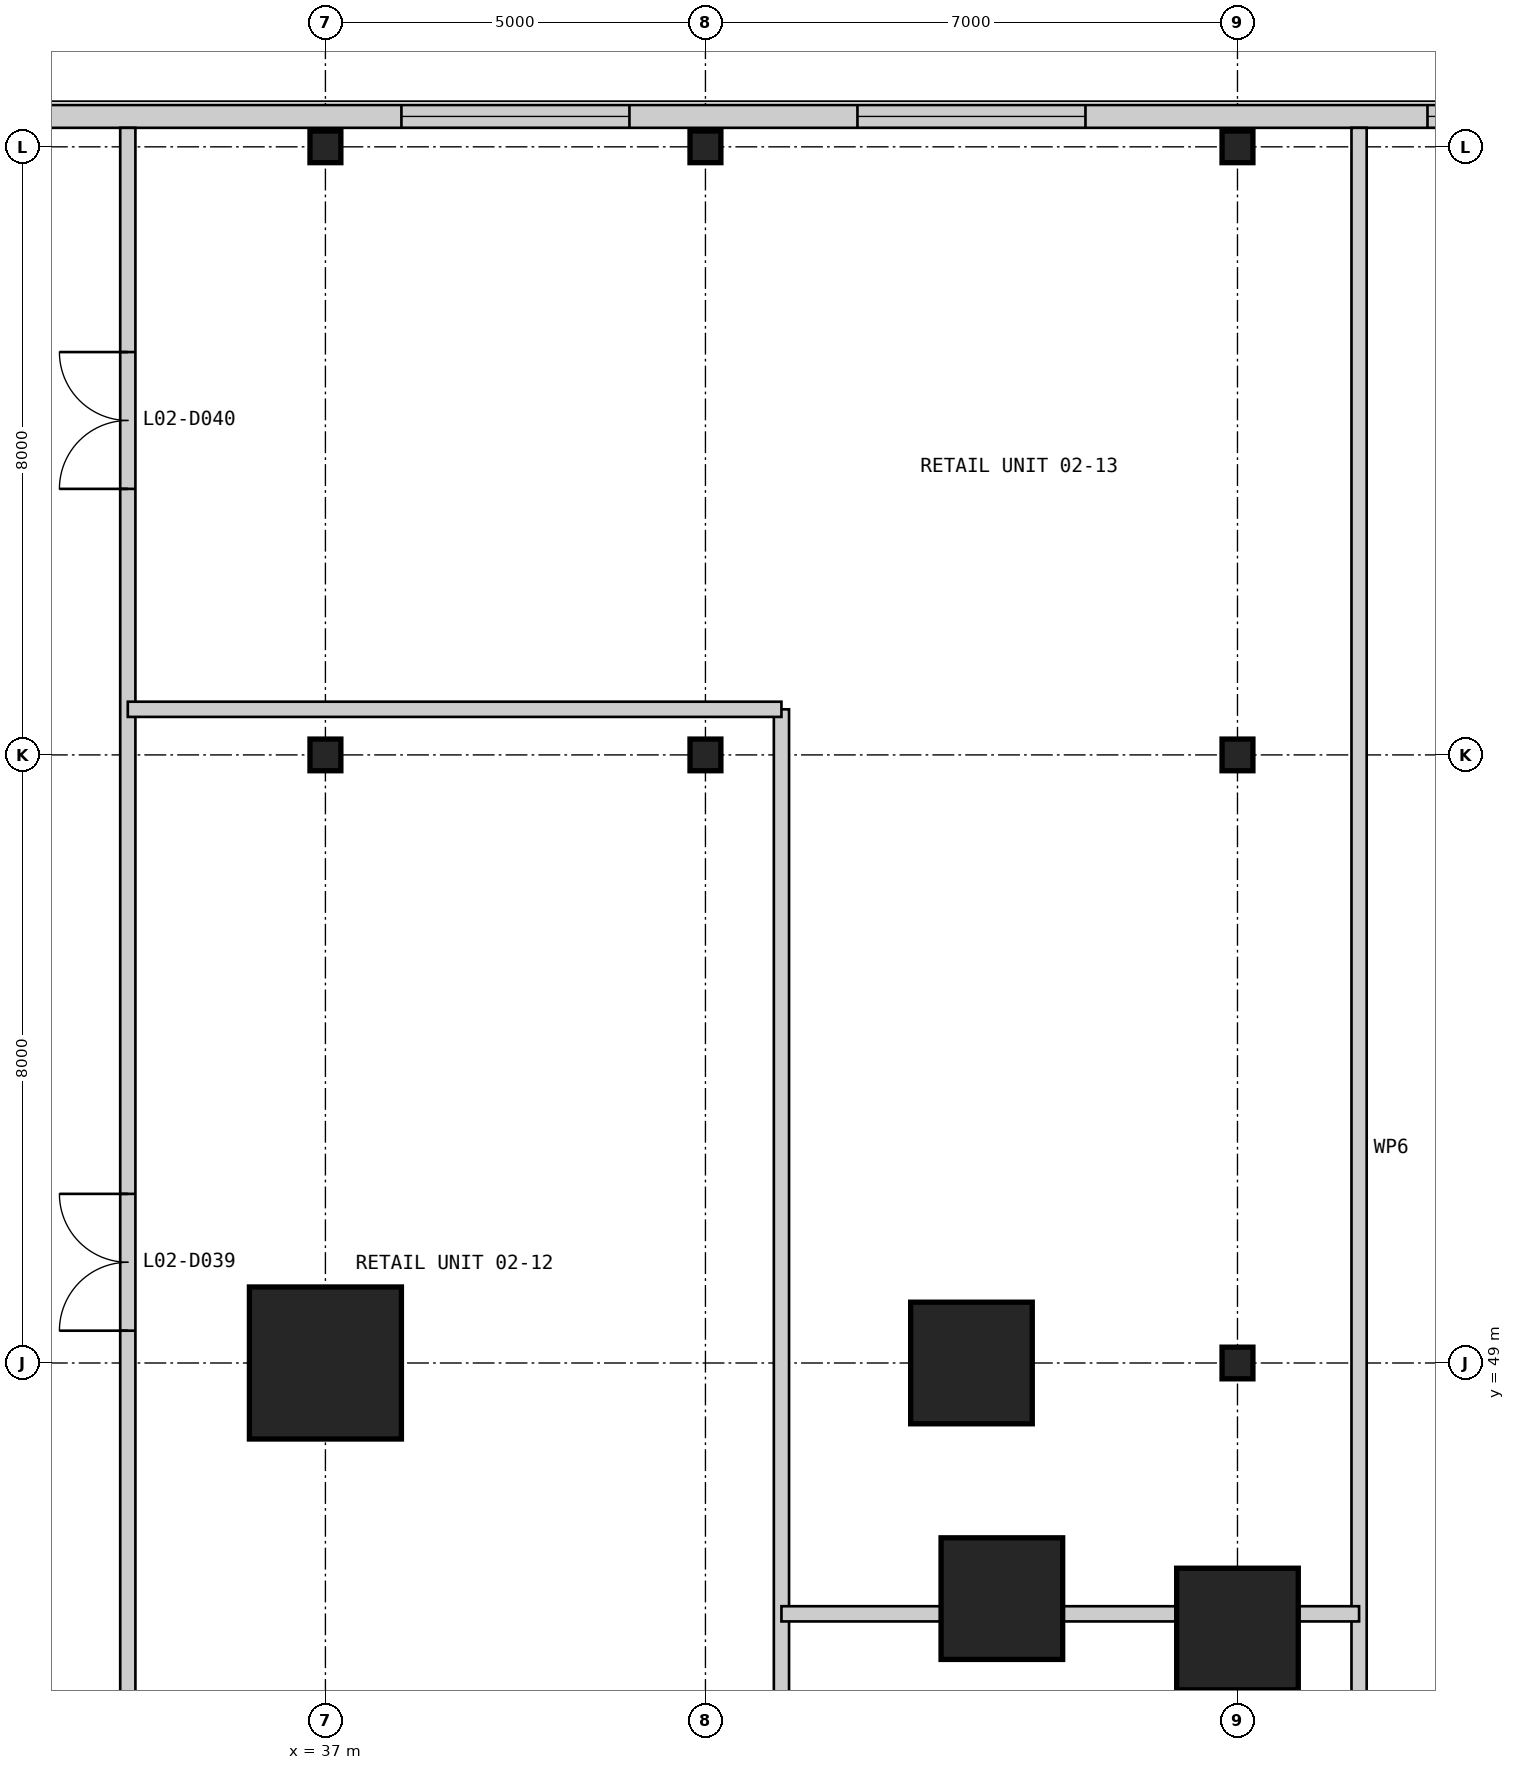
"""IFC4 building model, lengths in metres.
Left out: names, types, materials, properties, quantities, classifications, styles, units other than length and angle.
Written with IfcOpenShell. Run it as: python <this file> out.ifc"""

import sys

from ifc_helpers import new_model, si_unit, direction, frame, frame_2d, origin, origin_2d, place, context, subcontext, project, spatial, rectangle, i_section, extrude, element, fill, save


model = new_model("IFC4")
c1 = context("Model", 3, precision=1e-05, world=origin(), true_north=direction((0.0, 1.0)))
c2 = subcontext(c1, "Body", "Model", "MODEL_VIEW")
j1 = project(units=[si_unit("LENGTHUNIT", "METRE"), si_unit("PLANEANGLEUNIT", "RADIAN")], contexts=[c1])
p1 = place(None, origin())
s1 = spatial("IfcSite", under=j1, at=p1, CompositionType="ELEMENT")
p2 = place(p1, origin())
s2 = spatial("IfcBuilding", under=s1, at=p2, CompositionType="ELEMENT")
p3 = place(p2, frame((0.0, 0.0, 11.8)))
s3 = spatial("IfcBuildingStorey", under=s2, at=p3, CompositionType="ELEMENT", Elevation=11.8)
for number, where, z_axis, x_axis in (
    (1, (49.0, 45.5, 0.0), (0.0, 0.0, 1.0), (1.0, 0.0, 0.0)),
    (2, (45.9, 45.9, 0.0), (0.0, 0.0, 1.0), (1.0, 0.0, 0.0)),
    (3, (45.5, 49.0, 0.0), (0.0, 0.0, 1.0), (1.0, 0.0, 0.0)),
):
    element("IfcColumn", number, at=place(p3, frame(where, z_axis=z_axis, x_axis=x_axis)), inside=s3, PredefinedType="COLUMN", context=c2, shape_type="SweptSolid", body=[
        extrude(rectangle(XDim=1.6, YDim=1.6, at=origin_2d()), origin(), (0.0, 0.0, 1.0), 4.8),
    ])
p4 = place(p3, frame((37.0, 49.0, 0.0), z_axis=(0.0, 0.0, 1.0), x_axis=(1.0, 0.0, 0.0)))
e4 = element("IfcColumn", 4, at=p4, inside=s3, PredefinedType="COLUMN", context=c2, shape_type="SweptSolid", body=[
    extrude(rectangle(XDim=2.0, YDim=2.0, at=origin_2d()), origin(), (0.0, 0.0, 1.0), 4.8),
])
for number, where, z_axis, x_axis in (
    (5, (37.0, 57.0, 0.0), (0.0, 0.0, 1.0), (1.0, 0.0, 0.0)),
    (6, (37.0, 65.0, 0.0), (0.0, 0.0, 1.0), (1.0, 0.0, 0.0)),
    (7, (42.0, 57.0, 0.0), (0.0, 0.0, 1.0), (1.0, 0.0, 0.0)),
    (8, (42.0, 65.0, 0.0), (0.0, 0.0, 1.0), (1.0, 0.0, 0.0)),
    (9, (49.0, 49.0, 0.0), (0.0, 0.0, 1.0), (1.0, 0.0, 0.0)),
    (10, (49.0, 57.0, 0.0), (0.0, 0.0, 1.0), (1.0, 0.0, 0.0)),
    (11, (49.0, 65.0, 0.0), (0.0, 0.0, 1.0), (1.0, 0.0, 0.0)),
):
    element("IfcColumn", number, at=place(p3, frame(where, z_axis=z_axis, x_axis=x_axis)), inside=s3, PredefinedType="COLUMN", context=c2, shape_type="SweptSolid", body=[
        extrude(i_section(OverallWidth=0.406, OverallDepth=0.417, WebThickness=0.03, FlangeThickness=0.048, at=origin_2d()), origin(), (0.0, 0.0, 1.0), 4.8),
    ])
p5 = place(p3, frame((57.55, 65.4, 0.0), z_axis=(0.0, 0.0, 1.0), x_axis=(-1.0, 0.0, 0.0)))
e12 = element("IfcWall", 12, at=p5, inside=s3, PredefinedType="SOLIDWALL", context=c2, shape_type="SweptSolid", body=[
    extrude(rectangle(XDim=73.1, YDim=0.3, at=frame_2d((36.55, 0.0))), origin(), (0.0, 0.0, 1.0), 4.5),
])
p6 = place(p5, frame((67.05, 0.0, 0.9)))
e13 = element("IfcOpeningElement", 13, at=p6, cuts=e12, PredefinedType="OPENING", context=c2, shape_type="SweptSolid", body=[
    extrude(rectangle(XDim=3.0, YDim=2.4, at=frame_2d((1.5, 1.2))), frame((0.0, 0.16, 0.0), z_axis=(0.0, -1.0, 0.0), x_axis=(1.0, 0.0, 0.0)), (0.0, 0.0, 1.0), 0.32),
])
p7 = place(p5, frame((59.05, 0.0, 0.9)))
e14 = element("IfcOpeningElement", 14, at=p7, cuts=e12, PredefinedType="OPENING", context=c2, shape_type="SweptSolid", body=[
    extrude(rectangle(XDim=3.0, YDim=2.4, at=frame_2d((1.5, 1.2))), frame((0.0, 0.16, 0.0), z_axis=(0.0, -1.0, 0.0), x_axis=(1.0, 0.0, 0.0)), (0.0, 0.0, 1.0), 0.32),
])
p8 = place(p5, frame((51.05, 0.0, 0.9)))
e15 = element("IfcOpeningElement", 15, at=p8, cuts=e12, PredefinedType="OPENING", context=c2, shape_type="SweptSolid", body=[
    extrude(rectangle(XDim=3.0, YDim=2.4, at=frame_2d((1.5, 1.2))), frame((0.0, 0.16, 0.0), z_axis=(0.0, -1.0, 0.0), x_axis=(1.0, 0.0, 0.0)), (0.0, 0.0, 1.0), 0.32),
])
p9 = place(p5, frame((37.05, 0.0, 0.9)))
e16 = element("IfcOpeningElement", 16, at=p9, cuts=e12, PredefinedType="OPENING", context=c2, shape_type="SweptSolid", body=[
    extrude(rectangle(XDim=3.0, YDim=2.4, at=frame_2d((1.5, 1.2))), frame((0.0, 0.16, 0.0), z_axis=(0.0, -1.0, 0.0), x_axis=(1.0, 0.0, 0.0)), (0.0, 0.0, 1.0), 0.32),
])
p10 = place(p5, frame((25.05, 0.0, 0.9)))
e17 = element("IfcOpeningElement", 17, at=p10, cuts=e12, PredefinedType="OPENING", context=c2, shape_type="SweptSolid", body=[
    extrude(rectangle(XDim=3.0, YDim=2.4, at=frame_2d((1.5, 1.2))), frame((0.0, 0.16, 0.0), z_axis=(0.0, -1.0, 0.0), x_axis=(1.0, 0.0, 0.0)), (0.0, 0.0, 1.0), 0.32),
])
p11 = place(p5, frame((16.55, 0.0, 0.9)))
e18 = element("IfcOpeningElement", 18, at=p11, cuts=e12, PredefinedType="OPENING", context=c2, shape_type="SweptSolid", body=[
    extrude(rectangle(XDim=3.0, YDim=2.4, at=frame_2d((1.5, 1.2))), frame((0.0, 0.16, 0.0), z_axis=(0.0, -1.0, 0.0), x_axis=(1.0, 0.0, 0.0)), (0.0, 0.0, 1.0), 0.32),
])
p12 = place(p5, frame((10.55, 0.0, 0.9)))
e19 = element("IfcOpeningElement", 19, at=p12, cuts=e12, PredefinedType="OPENING", context=c2, shape_type="SweptSolid", body=[
    extrude(rectangle(XDim=3.0, YDim=2.4, at=frame_2d((1.5, 1.2))), frame((0.0, 0.16, 0.0), z_axis=(0.0, -1.0, 0.0), x_axis=(1.0, 0.0, 0.0)), (0.0, 0.0, 1.0), 0.32),
])
p13 = place(p5, frame((3.05, 0.0, 0.9)))
e20 = element("IfcOpeningElement", 20, at=p13, cuts=e12, PredefinedType="OPENING", context=c2, shape_type="SweptSolid", body=[
    extrude(rectangle(XDim=3.0, YDim=2.4, at=frame_2d((1.5, 1.2))), frame((0.0, 0.16, 0.0), z_axis=(0.0, -1.0, 0.0), x_axis=(1.0, 0.0, 0.0)), (0.0, 0.0, 1.0), 0.32),
])
p14 = place(p3, frame((34.4, 43.0, 0.0), z_axis=(0.0, 0.0, 1.0), x_axis=(0.0, 1.0, 0.0)))
e21 = element("IfcWall", 21, at=p14, inside=s3, PredefinedType="PARTITIONING", context=c2, shape_type="SweptSolid", body=[
    extrude(rectangle(XDim=22.25, YDim=0.2, at=frame_2d((11.125, 0.0))), origin(), (0.0, 0.0, 1.0), 4.5),
])
p15 = place(p14, frame((6.425, 0.0, 0.0)))
e22 = element("IfcOpeningElement", 22, at=p15, cuts=e21, PredefinedType="OPENING", context=c2, shape_type="SweptSolid", body=[
    extrude(rectangle(XDim=1.8, YDim=2.4, at=frame_2d((0.9, 1.2))), frame((0.0, 0.11, 0.0), z_axis=(0.0, -1.0, 0.0), x_axis=(1.0, 0.0, 0.0)), (0.0, 0.0, 1.0), 0.22),
])
p16 = place(p14, frame((17.5, 0.0, 0.0)))
e23 = element("IfcOpeningElement", 23, at=p16, cuts=e21, PredefinedType="OPENING", context=c2, shape_type="SweptSolid", body=[
    extrude(rectangle(XDim=1.8, YDim=2.4, at=frame_2d((0.9, 1.2))), frame((0.0, 0.11, 0.0), z_axis=(0.0, -1.0, 0.0), x_axis=(1.0, 0.0, 0.0)), (0.0, 0.0, 1.0), 0.22),
])
p17 = place(p3, frame((43.0, 37.0, 0.0), z_axis=(0.0, 0.0, 1.0), x_axis=(0.0, 1.0, 0.0)))
e24 = element("IfcWall", 24, at=p17, inside=s3, PredefinedType="PARTITIONING", context=c2, shape_type="SweptSolid", body=[
    extrude(rectangle(XDim=20.6, YDim=0.2, at=frame_2d((10.3, 0.0))), origin(), (0.0, 0.0, 1.0), 4.5),
])
p18 = place(p3, frame((50.6, 38.4, 0.0), z_axis=(0.0, 0.0, 1.0), x_axis=(0.0, 1.0, 0.0)))
e25 = element("IfcWall", 25, at=p18, inside=s3, PredefinedType="PARTITIONING", context=c2, shape_type="SweptSolid", body=[
    extrude(rectangle(XDim=26.85, YDim=0.2, at=frame_2d((13.425, 0.0))), origin(), (0.0, 0.0, 1.0), 4.5),
])
p19 = place(p3, frame((43.0, 45.7, 0.0), z_axis=(0.0, 0.0, 1.0), x_axis=(1.0, 0.0, 0.0)))
e26 = element("IfcWall", 26, at=p19, inside=s3, PredefinedType="PARTITIONING", context=c2, shape_type="SweptSolid", body=[
    extrude(rectangle(XDim=2.1, YDim=0.2, at=frame_2d((1.05, 0.0))), origin(), (0.0, 0.0, 1.0), 4.5),
])
p20 = place(p3, frame((46.7, 45.7, 0.0), z_axis=(0.0, 0.0, 1.0), x_axis=(1.0, 0.0, 0.0)))
e27 = element("IfcWall", 27, at=p20, inside=s3, PredefinedType="PARTITIONING", context=c2, shape_type="SweptSolid", body=[
    extrude(rectangle(XDim=1.5, YDim=0.2, at=frame_2d((0.75, 0.0))), origin(), (0.0, 0.0, 1.0), 3.65),
])
p21 = place(p3, frame((49.8, 45.7, 0.0), z_axis=(0.0, 0.0, 1.0), x_axis=(1.0, 0.0, 0.0)))
e28 = element("IfcWall", 28, at=p21, inside=s3, PredefinedType="PARTITIONING", context=c2, shape_type="SweptSolid", body=[
    extrude(rectangle(XDim=0.8, YDim=0.2, at=frame_2d((0.4, 0.0))), origin(), (0.0, 0.0, 1.0), 4.5),
])
p22 = place(p3, frame((34.4, 57.6, 0.0), z_axis=(0.0, 0.0, 1.0), x_axis=(1.0, 0.0, 0.0)))
e29 = element("IfcWall", 29, at=p22, inside=s3, PredefinedType="PARTITIONING", context=c2, shape_type="SweptSolid", body=[
    extrude(rectangle(XDim=8.6, YDim=0.2, at=frame_2d((4.3, 0.0))), origin(), (0.0, 0.0, 1.0), 4.5),
])
p23 = place(p11, origin())
e30 = element("IfcWindow", 30, at=p23, inside=s3, PartitioningType="SINGLE_PANEL", PredefinedType="WINDOW", context=c2, shape_type="SweptSolid", body=[
    extrude(rectangle(XDim=3.0, YDim=2.4, at=frame_2d((1.5, 1.2))), frame((0.0, 0.03, 0.0), z_axis=(0.0, -1.0, 0.0), x_axis=(1.0, 0.0, 0.0)), (0.0, 0.0, 1.0), 0.06),
])
fill(e18, e30)
p24 = place(p12, origin())
e31 = element("IfcWindow", 31, at=p24, inside=s3, PartitioningType="SINGLE_PANEL", PredefinedType="WINDOW", context=c2, shape_type="SweptSolid", body=[
    extrude(rectangle(XDim=3.0, YDim=2.4, at=frame_2d((1.5, 1.2))), frame((0.0, 0.03, 0.0), z_axis=(0.0, -1.0, 0.0), x_axis=(1.0, 0.0, 0.0)), (0.0, 0.0, 1.0), 0.06),
])
fill(e19, e31)
p25 = place(p13, origin())
e32 = element("IfcWindow", 32, at=p25, inside=s3, PartitioningType="SINGLE_PANEL", PredefinedType="WINDOW", context=c2, shape_type="SweptSolid", body=[
    extrude(rectangle(XDim=3.0, YDim=2.4, at=frame_2d((1.5, 1.2))), frame((0.0, 0.03, 0.0), z_axis=(0.0, -1.0, 0.0), x_axis=(1.0, 0.0, 0.0)), (0.0, 0.0, 1.0), 0.06),
])
fill(e20, e32)
p26 = place(p15, origin())
e33 = element("IfcDoor", 33, at=p26, inside=s3, OperationType="DOUBLE_DOOR_SINGLE_SWING", PredefinedType="DOOR", context=c2, shape_type="SweptSolid", body=[
    extrude(rectangle(XDim=1.8, YDim=2.4, at=frame_2d((0.9, 1.2))), frame((0.0, 0.025, 0.0), z_axis=(0.0, -1.0, 0.0), x_axis=(1.0, 0.0, 0.0)), (0.0, 0.0, 1.0), 0.05),
])
fill(e22, e33)
p27 = place(p16, origin())
e34 = element("IfcDoor", 34, at=p27, inside=s3, OperationType="DOUBLE_DOOR_SINGLE_SWING", PredefinedType="DOOR", context=c2, shape_type="SweptSolid", body=[
    extrude(rectangle(XDim=1.8, YDim=2.4, at=frame_2d((0.9, 1.2))), frame((0.0, 0.025, 0.0), z_axis=(0.0, -1.0, 0.0), x_axis=(1.0, 0.0, 0.0)), (0.0, 0.0, 1.0), 0.05),
])
fill(e23, e34)
save(model, sys.argv[1])
